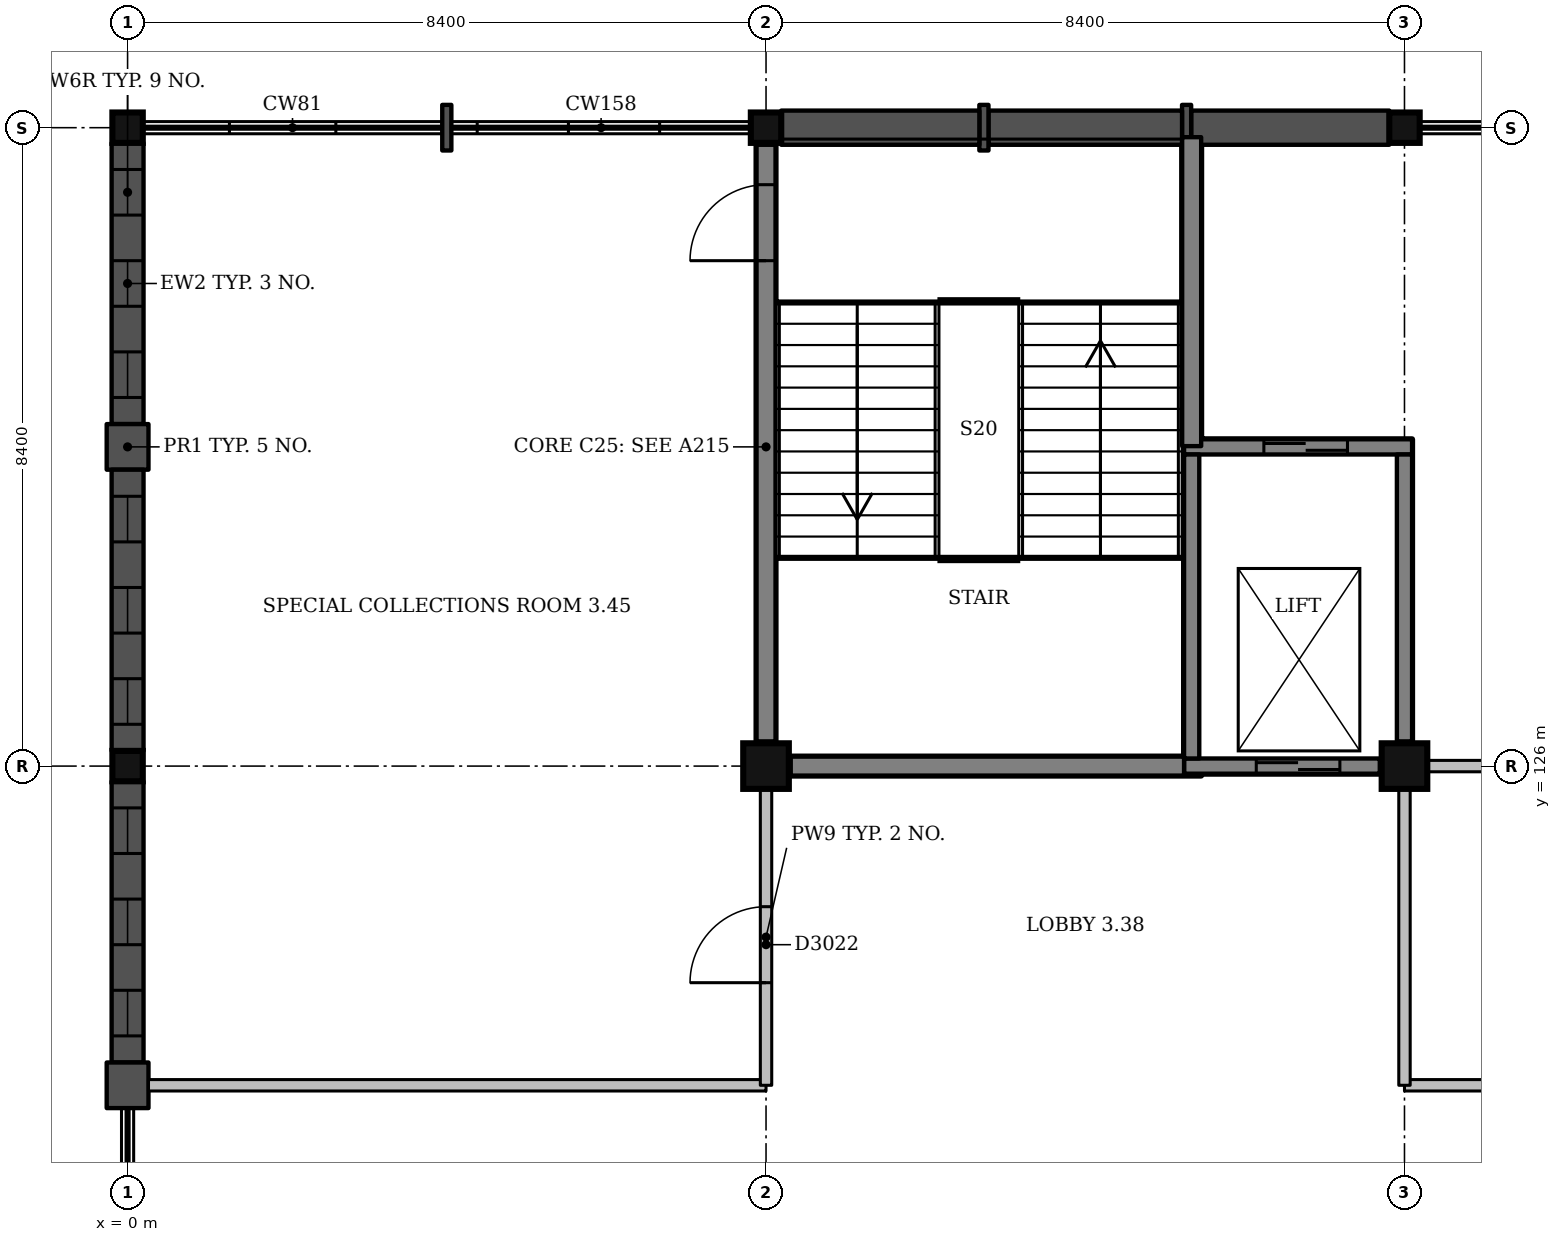
"""IFC4 building model, lengths in metres.
Left out: names, types, materials, properties, quantities, classifications, styles, units other than length and angle.
Written with IfcOpenShell. Run it as: python <this file> out.ifc"""

import sys

from ifc_helpers import new_model, si_unit, direction, frame, frame_2d, origin, origin_2d, place, context, subcontext, project, spatial, rectangle, extrude, element, fill, save


model = new_model("IFC4")
c1 = context("Model", 3, precision=1e-05, world=origin(), true_north=direction((0.0, 1.0)))
c2 = subcontext(c1, "Body", "Model", "MODEL_VIEW")
j1 = project(units=[si_unit("LENGTHUNIT", "METRE"), si_unit("PLANEANGLEUNIT", "RADIAN")], contexts=[c1])
p1 = place(None, origin())
s1 = spatial("IfcSite", under=j1, at=p1, CompositionType="ELEMENT")
p2 = place(p1, origin())
s2 = spatial("IfcBuilding", under=s1, at=p2, CompositionType="ELEMENT")
p3 = place(p2, frame((0.0, 0.0, 13.5)))
s3 = spatial("IfcBuildingStorey", under=s2, at=p3, CompositionType="ELEMENT", Elevation=13.5)
for number, where, z_axis, x_axis in (
    (1, (0.0, 126.0, 0.0), (0.0, 0.0, 1.0), (1.0, 0.0, 0.0)),
    (2, (0.0, 134.4, 0.0), (0.0, 0.0, 1.0), (1.0, 0.0, 0.0)),
):
    element("IfcColumn", number, at=place(p3, frame(where, z_axis=z_axis, x_axis=x_axis)), inside=s3, PredefinedType="COLUMN", context=c2, shape_type="SweptSolid", body=[
        extrude(rectangle(XDim=0.4, YDim=0.4, at=origin_2d()), origin(), (0.0, 0.0, 1.0), 4.5),
    ])
p4 = place(p3, frame((8.4, 126.0, 0.0), z_axis=(0.0, 0.0, 1.0), x_axis=(1.0, 0.0, 0.0)))
e3 = element("IfcColumn", 3, at=p4, inside=s3, PredefinedType="COLUMN", context=c2, shape_type="SweptSolid", body=[
    extrude(rectangle(XDim=0.6, YDim=0.6, at=origin_2d()), origin(), (0.0, 0.0, 1.0), 4.5),
])
p5 = place(p3, frame((8.4, 134.4, 0.0), z_axis=(0.0, 0.0, 1.0), x_axis=(1.0, 0.0, 0.0)))
e4 = element("IfcColumn", 4, at=p5, inside=s3, PredefinedType="COLUMN", context=c2, shape_type="SweptSolid", body=[
    extrude(rectangle(XDim=0.4, YDim=0.4, at=origin_2d()), origin(), (0.0, 0.0, 1.0), 4.5),
])
p6 = place(p3, frame((16.8, 126.0, 0.0), z_axis=(0.0, 0.0, 1.0), x_axis=(1.0, 0.0, 0.0)))
e5 = element("IfcColumn", 5, at=p6, inside=s3, PredefinedType="COLUMN", context=c2, shape_type="SweptSolid", body=[
    extrude(rectangle(XDim=0.6, YDim=0.6, at=origin_2d()), origin(), (0.0, 0.0, 1.0), 4.5),
])
p7 = place(p3, frame((16.8, 134.4, 0.0), z_axis=(0.0, 0.0, 1.0), x_axis=(1.0, 0.0, 0.0)))
e6 = element("IfcColumn", 6, at=p7, inside=s3, PredefinedType="COLUMN", context=c2, shape_type="SweptSolid", body=[
    extrude(rectangle(XDim=0.4, YDim=0.4, at=origin_2d()), origin(), (0.0, 0.0, 1.0), 4.5),
])
p8 = place(p3, frame((13.9, 126.0, 0.0), z_axis=(0.0, 0.0, 1.0), x_axis=(1.0, 0.0, 0.0)))
e7 = element("IfcWall", 7, at=p8, inside=s3, PredefinedType="SHEAR", context=c2, shape_type="SweptSolid", body=[
    extrude(rectangle(XDim=2.575, YDim=0.2, at=frame_2d((1.288, 0.0))), origin(), (0.0, 0.0, 1.0), 4.5),
])
p9 = place(p8, frame((0.95, 0.0, 0.0)))
e8 = element("IfcOpeningElement", 8, at=p9, cuts=e7, PredefinedType="OPENING", context=c2, shape_type="SweptSolid", body=[
    extrude(rectangle(XDim=1.1, YDim=2.1, at=frame_2d((0.55, 1.05))), frame((0.0, 0.11, 0.0), z_axis=(0.0, -1.0, 0.0), x_axis=(1.0, 0.0, 0.0)), (0.0, 0.0, 1.0), 0.22),
])
p10 = place(p3, frame((13.9, 130.2, 0.0), z_axis=(0.0, 0.0, 1.0), x_axis=(1.0, 0.0, 0.0)))
e9 = element("IfcWall", 9, at=p10, inside=s3, PredefinedType="SHEAR", context=c2, shape_type="SweptSolid", body=[
    extrude(rectangle(XDim=3.0, YDim=0.2, at=frame_2d((1.5, 0.0))), origin(), (0.0, 0.0, 1.0), 4.5),
])
p11 = place(p10, frame((1.05, 0.0, 0.0)))
e10 = element("IfcOpeningElement", 10, at=p11, cuts=e9, PredefinedType="OPENING", context=c2, shape_type="SweptSolid", body=[
    extrude(rectangle(XDim=1.1, YDim=2.1, at=frame_2d((0.55, 1.05))), frame((0.0, 0.11, 0.0), z_axis=(0.0, -1.0, 0.0), x_axis=(1.0, 0.0, 0.0)), (0.0, 0.0, 1.0), 0.22),
])
p12 = place(p3, frame((14.0, 126.1, 0.0), z_axis=(0.0, 0.0, 1.0), x_axis=(0.0, 1.0, 0.0)))
e11 = element("IfcWall", 11, at=p12, inside=s3, PredefinedType="SHEAR", context=c2, shape_type="SweptSolid", body=[
    extrude(rectangle(XDim=4.0, YDim=0.2, at=frame_2d((2.0, 0.0))), origin(), (0.0, 0.0, 1.0), 4.5),
])
p13 = place(p3, frame((16.8, 126.325, 0.0), z_axis=(0.0, 0.0, 1.0), x_axis=(0.0, 1.0, 0.0)))
e12 = element("IfcWall", 12, at=p13, inside=s3, PredefinedType="SHEAR", context=c2, shape_type="SweptSolid", body=[
    extrude(rectangle(XDim=3.775, YDim=0.2, at=frame_2d((1.888, 0.0))), origin(), (0.0, 0.0, 1.0), 4.5),
])
p14 = place(p3, frame((8.725, 126.0, 0.0), z_axis=(0.0, 0.0, 1.0), x_axis=(1.0, 0.0, 0.0)))
e13 = element("IfcWall", 13, at=p14, inside=s3, PredefinedType="SHEAR", context=c2, shape_type="SweptSolid", body=[
    extrude(rectangle(XDim=5.175, YDim=0.25, at=frame_2d((2.587, 0.0))), origin(), (0.0, 0.0, 1.0), 4.5),
])
p15 = place(p3, frame((8.4, 126.325, 0.0), z_axis=(0.0, 0.0, 1.0), x_axis=(0.0, 1.0, 0.0)))
e14 = element("IfcWall", 14, at=p15, inside=s3, PredefinedType="SHEAR", context=c2, shape_type="SweptSolid", body=[
    extrude(rectangle(XDim=7.85, YDim=0.25, at=frame_2d((3.925, 0.0))), origin(), (0.0, 0.0, 1.0), 4.5),
])
p16 = place(p15, frame((6.325, 0.0, 0.0)))
e15 = element("IfcOpeningElement", 15, at=p16, cuts=e14, PredefinedType="OPENING", context=c2, shape_type="SweptSolid", body=[
    extrude(rectangle(XDim=1.0, YDim=2.1, at=frame_2d((0.5, 1.05))), frame((0.0, 0.135, 0.0), z_axis=(0.0, -1.0, 0.0), x_axis=(1.0, 0.0, 0.0)), (0.0, 0.0, 1.0), 0.27),
])
p17 = place(p3, frame((14.0, 130.21, 0.0), z_axis=(0.0, 0.0, 1.0), x_axis=(0.0, 1.0, 0.0)))
e16 = element("IfcWall", 16, at=p17, inside=s3, PredefinedType="SHEAR", context=c2, shape_type="SweptSolid", body=[
    extrude(rectangle(XDim=4.065, YDim=0.25, at=frame_2d((2.032, 0.0))), origin(), (0.0, 0.0, 1.0), 4.5),
])
p18 = place(p3, frame((16.6, 134.4, 0.0), z_axis=(0.0, 0.0, 1.0), x_axis=(-1.0, 0.0, 0.0)))
e17 = element("IfcWall", 17, at=p18, inside=s3, PredefinedType="SOLIDWALL", context=c2, shape_type="SweptSolid", body=[
    extrude(rectangle(XDim=2.607, YDim=0.45, at=frame_2d((1.303, 0.0))), origin(), (0.0, 0.0, 1.0), 3.35),
])
p19 = place(p3, frame((13.993, 134.4, 0.0), z_axis=(0.0, 0.0, 1.0), x_axis=(-1.0, 0.0, 0.0)))
e18 = element("IfcWall", 18, at=p19, inside=s3, PredefinedType="SOLIDWALL", context=c2, shape_type="SweptSolid", body=[
    extrude(rectangle(XDim=0.12, YDim=0.6, at=frame_2d((0.06, 0.0))), origin(), (0.0, 0.0, 1.0), 3.35),
])
p20 = place(p3, frame((13.873, 134.4, 0.0), z_axis=(0.0, 0.0, 1.0), x_axis=(-1.0, 0.0, 0.0)))
e19 = element("IfcWall", 19, at=p20, inside=s3, PredefinedType="SOLIDWALL", context=c2, shape_type="SweptSolid", body=[
    extrude(rectangle(XDim=2.547, YDim=0.45, at=frame_2d((1.273, 0.0))), origin(), (0.0, 0.0, 1.0), 3.35),
])
p21 = place(p3, frame((11.327, 134.4, 0.0), z_axis=(0.0, 0.0, 1.0), x_axis=(-1.0, 0.0, 0.0)))
e20 = element("IfcWall", 20, at=p21, inside=s3, PredefinedType="SOLIDWALL", context=c2, shape_type="SweptSolid", body=[
    extrude(rectangle(XDim=0.12, YDim=0.6, at=frame_2d((0.06, 0.0))), origin(), (0.0, 0.0, 1.0), 3.35),
])
p22 = place(p3, frame((11.207, 134.4, 0.0), z_axis=(0.0, 0.0, 1.0), x_axis=(-1.0, 0.0, 0.0)))
e21 = element("IfcWall", 21, at=p22, inside=s3, PredefinedType="SOLIDWALL", context=c2, shape_type="SweptSolid", body=[
    extrude(rectangle(XDim=2.607, YDim=0.45, at=frame_2d((1.303, 0.0))), origin(), (0.0, 0.0, 1.0), 3.35),
])
p23 = place(p3, frame((4.26, 134.4, 0.0), z_axis=(0.0, 0.0, 1.0), x_axis=(-1.0, 0.0, 0.0)))
e22 = element("IfcWall", 22, at=p23, inside=s3, PredefinedType="SOLIDWALL", context=c2, shape_type="SweptSolid", body=[
    extrude(rectangle(XDim=0.12, YDim=0.6, at=frame_2d((0.06, 0.0))), origin(), (0.0, 0.0, 1.0), 3.35),
])
p24 = place(p3, frame((0.0, 134.2, 0.0), z_axis=(0.0, 0.0, 1.0), x_axis=(0.0, -1.0, 0.0)))
e23 = element("IfcWall", 23, at=p24, inside=s3, PredefinedType="SOLIDWALL", context=c2, shape_type="SweptSolid", body=[
    extrude(rectangle(XDim=3.7, YDim=0.42, at=frame_2d((1.85, 0.0))), origin(), (0.0, 0.0, 1.0), 3.35),
])
p25 = place(p24, frame((0.35, 0.0, 1.0)))
e24 = element("IfcOpeningElement", 24, at=p25, cuts=e23, PredefinedType="OPENING", context=c2, shape_type="SweptSolid", body=[
    extrude(rectangle(XDim=0.6, YDim=1.8, at=frame_2d((0.3, 0.9))), frame((0.0, 0.22, 0.0), z_axis=(0.0, -1.0, 0.0), x_axis=(1.0, 0.0, 0.0)), (0.0, 0.0, 1.0), 0.44),
])
p26 = place(p24, frame((1.55, 0.0, 1.0)))
e25 = element("IfcOpeningElement", 25, at=p26, cuts=e23, PredefinedType="OPENING", context=c2, shape_type="SweptSolid", body=[
    extrude(rectangle(XDim=0.6, YDim=1.8, at=frame_2d((0.3, 0.9))), frame((0.0, 0.22, 0.0), z_axis=(0.0, -1.0, 0.0), x_axis=(1.0, 0.0, 0.0)), (0.0, 0.0, 1.0), 0.44),
])
p27 = place(p24, frame((2.75, 0.0, 1.0)))
e26 = element("IfcOpeningElement", 26, at=p27, cuts=e23, PredefinedType="OPENING", context=c2, shape_type="SweptSolid", body=[
    extrude(rectangle(XDim=0.6, YDim=1.8, at=frame_2d((0.3, 0.9))), frame((0.0, 0.22, 0.0), z_axis=(0.0, -1.0, 0.0), x_axis=(1.0, 0.0, 0.0)), (0.0, 0.0, 1.0), 0.44),
])
p28 = place(p3, frame((0.0, 130.5, 0.0), z_axis=(0.0, 0.0, 1.0), x_axis=(0.0, -1.0, 0.0)))
e27 = element("IfcWall", 27, at=p28, inside=s3, PredefinedType="SOLIDWALL", context=c2, shape_type="SweptSolid", body=[
    extrude(rectangle(XDim=0.6, YDim=0.55, at=frame_2d((0.3, 0.0))), origin(), (0.0, 0.0, 1.0), 3.35),
])
p29 = place(p3, frame((0.0, 129.9, 0.0), z_axis=(0.0, 0.0, 1.0), x_axis=(0.0, -1.0, 0.0)))
e28 = element("IfcWall", 28, at=p29, inside=s3, PredefinedType="SOLIDWALL", context=c2, shape_type="SweptSolid", body=[
    extrude(rectangle(XDim=3.7, YDim=0.42, at=frame_2d((1.85, 0.0))), origin(), (0.0, 0.0, 1.0), 3.35),
])
p30 = place(p29, frame((0.35, 0.0, 1.0)))
e29 = element("IfcOpeningElement", 29, at=p30, cuts=e28, PredefinedType="OPENING", context=c2, shape_type="SweptSolid", body=[
    extrude(rectangle(XDim=0.6, YDim=1.8, at=frame_2d((0.3, 0.9))), frame((0.0, 0.22, 0.0), z_axis=(0.0, -1.0, 0.0), x_axis=(1.0, 0.0, 0.0)), (0.0, 0.0, 1.0), 0.44),
])
p31 = place(p29, frame((1.55, 0.0, 1.0)))
e30 = element("IfcOpeningElement", 30, at=p31, cuts=e28, PredefinedType="OPENING", context=c2, shape_type="SweptSolid", body=[
    extrude(rectangle(XDim=0.6, YDim=1.8, at=frame_2d((0.3, 0.9))), frame((0.0, 0.22, 0.0), z_axis=(0.0, -1.0, 0.0), x_axis=(1.0, 0.0, 0.0)), (0.0, 0.0, 1.0), 0.44),
])
p32 = place(p29, frame((2.75, 0.0, 1.0)))
e31 = element("IfcOpeningElement", 31, at=p32, cuts=e28, PredefinedType="OPENING", context=c2, shape_type="SweptSolid", body=[
    extrude(rectangle(XDim=0.6, YDim=1.8, at=frame_2d((0.3, 0.9))), frame((0.0, 0.22, 0.0), z_axis=(0.0, -1.0, 0.0), x_axis=(1.0, 0.0, 0.0)), (0.0, 0.0, 1.0), 0.44),
])
p33 = place(p3, frame((0.0, 125.8, 0.0), z_axis=(0.0, 0.0, 1.0), x_axis=(0.0, -1.0, 0.0)))
e32 = element("IfcWall", 32, at=p33, inside=s3, PredefinedType="SOLIDWALL", context=c2, shape_type="SweptSolid", body=[
    extrude(rectangle(XDim=3.7, YDim=0.42, at=frame_2d((1.85, 0.0))), origin(), (0.0, 0.0, 1.0), 3.35),
])
p34 = place(p33, frame((0.35, 0.0, 1.0)))
e33 = element("IfcOpeningElement", 33, at=p34, cuts=e32, PredefinedType="OPENING", context=c2, shape_type="SweptSolid", body=[
    extrude(rectangle(XDim=0.6, YDim=1.8, at=frame_2d((0.3, 0.9))), frame((0.0, 0.22, 0.0), z_axis=(0.0, -1.0, 0.0), x_axis=(1.0, 0.0, 0.0)), (0.0, 0.0, 1.0), 0.44),
])
p35 = place(p33, frame((1.55, 0.0, 1.0)))
e34 = element("IfcOpeningElement", 34, at=p35, cuts=e32, PredefinedType="OPENING", context=c2, shape_type="SweptSolid", body=[
    extrude(rectangle(XDim=0.6, YDim=1.8, at=frame_2d((0.3, 0.9))), frame((0.0, 0.22, 0.0), z_axis=(0.0, -1.0, 0.0), x_axis=(1.0, 0.0, 0.0)), (0.0, 0.0, 1.0), 0.44),
])
p36 = place(p33, frame((2.75, 0.0, 1.0)))
e35 = element("IfcOpeningElement", 35, at=p36, cuts=e32, PredefinedType="OPENING", context=c2, shape_type="SweptSolid", body=[
    extrude(rectangle(XDim=0.6, YDim=1.8, at=frame_2d((0.3, 0.9))), frame((0.0, 0.22, 0.0), z_axis=(0.0, -1.0, 0.0), x_axis=(1.0, 0.0, 0.0)), (0.0, 0.0, 1.0), 0.44),
])
p37 = place(p3, frame((0.0, 122.1, 0.0), z_axis=(0.0, 0.0, 1.0), x_axis=(0.0, -1.0, 0.0)))
e36 = element("IfcWall", 36, at=p37, inside=s3, PredefinedType="SOLIDWALL", context=c2, shape_type="SweptSolid", body=[
    extrude(rectangle(XDim=0.6, YDim=0.55, at=frame_2d((0.3, 0.0))), origin(), (0.0, 0.0, 1.0), 3.35),
])
p38 = place(p3, frame((0.275, 121.8, 0.0), z_axis=(0.0, 0.0, 1.0), x_axis=(1.0, 0.0, 0.0)))
e37 = element("IfcWall", 37, at=p38, inside=s3, PredefinedType="PARTITIONING", context=c2, shape_type="SweptSolid", body=[
    extrude(rectangle(XDim=8.125, YDim=0.15, at=frame_2d((4.062, 0.0))), origin(), (0.0, 0.0, 1.0), 3.4),
])
p39 = place(p3, frame((16.8, 121.8, 0.0), z_axis=(0.0, 0.0, 1.0), x_axis=(1.0, 0.0, 0.0)))
e38 = element("IfcWall", 38, at=p39, inside=s3, PredefinedType="PARTITIONING", context=c2, shape_type="SweptSolid", body=[
    extrude(rectangle(XDim=8.4, YDim=0.15, at=frame_2d((4.2, 0.0))), origin(), (0.0, 0.0, 1.0), 3.4),
])
p40 = place(p39, frame((3.8, 0.0, 0.0)))
e39 = element("IfcOpeningElement", 39, at=p40, cuts=e38, PredefinedType="OPENING", context=c2, shape_type="SweptSolid", body=[
    extrude(rectangle(XDim=0.9, YDim=2.1, at=frame_2d((0.45, 1.05))), frame((0.0, 0.085, 0.0), z_axis=(0.0, -1.0, 0.0), x_axis=(1.0, 0.0, 0.0)), (0.0, 0.0, 1.0), 0.17),
])
p41 = place(p3, frame((17.1, 126.0, 0.0), z_axis=(0.0, 0.0, 1.0), x_axis=(1.0, 0.0, 0.0)))
e40 = element("IfcWall", 40, at=p41, inside=s3, PredefinedType="PARTITIONING", context=c2, shape_type="SweptSolid", body=[
    extrude(rectangle(XDim=7.825, YDim=0.15, at=frame_2d((3.913, 0.0))), origin(), (0.0, 0.0, 1.0), 3.4),
])
p42 = place(p41, frame((3.1, 0.0, 0.0)))
e41 = element("IfcOpeningElement", 41, at=p42, cuts=e40, PredefinedType="OPENING", context=c2, shape_type="SweptSolid", body=[
    extrude(rectangle(XDim=1.8, YDim=2.1, at=frame_2d((0.9, 1.05))), frame((0.0, 0.085, 0.0), z_axis=(0.0, -1.0, 0.0), x_axis=(1.0, 0.0, 0.0)), (0.0, 0.0, 1.0), 0.17),
])
p43 = place(p3, frame((8.4, 121.8, 0.0), z_axis=(0.0, 0.0, 1.0), x_axis=(0.0, 1.0, 0.0)))
e42 = element("IfcWall", 42, at=p43, inside=s3, PredefinedType="PARTITIONING", context=c2, shape_type="SweptSolid", body=[
    extrude(rectangle(XDim=3.9, YDim=0.15, at=frame_2d((1.95, 0.0))), origin(), (0.0, 0.0, 1.0), 3.4),
])
p44 = place(p43, frame((1.35, 0.0, 0.0)))
e43 = element("IfcOpeningElement", 43, at=p44, cuts=e42, PredefinedType="OPENING", context=c2, shape_type="SweptSolid", body=[
    extrude(rectangle(XDim=1.0, YDim=2.1, at=frame_2d((0.5, 1.05))), frame((0.0, 0.085, 0.0), z_axis=(0.0, -1.0, 0.0), x_axis=(1.0, 0.0, 0.0)), (0.0, 0.0, 1.0), 0.17),
])
p45 = place(p3, frame((16.8, 121.8, 0.0), z_axis=(0.0, 0.0, 1.0), x_axis=(0.0, 1.0, 0.0)))
e44 = element("IfcWall", 44, at=p45, inside=s3, PredefinedType="PARTITIONING", context=c2, shape_type="SweptSolid", body=[
    extrude(rectangle(XDim=3.9, YDim=0.15, at=frame_2d((1.95, 0.0))), origin(), (0.0, 0.0, 1.0), 3.4),
])
p46 = place(p25, origin())
e45 = element("IfcWindow", 45, at=p46, inside=s3, PartitioningType="SINGLE_PANEL", PredefinedType="WINDOW", context=c2, shape_type="SweptSolid", body=[
    extrude(rectangle(XDim=0.6, YDim=1.8, at=frame_2d((0.3, 0.9))), frame((0.0, 0.15, 0.0), z_axis=(0.0, -1.0, 0.0), x_axis=(1.0, 0.0, 0.0)), (0.0, 0.0, 1.0), 0.06),
])
fill(e24, e45)
p47 = place(p26, origin())
e46 = element("IfcWindow", 46, at=p47, inside=s3, PartitioningType="SINGLE_PANEL", PredefinedType="WINDOW", context=c2, shape_type="SweptSolid", body=[
    extrude(rectangle(XDim=0.6, YDim=1.8, at=frame_2d((0.3, 0.9))), frame((0.0, 0.15, 0.0), z_axis=(0.0, -1.0, 0.0), x_axis=(1.0, 0.0, 0.0)), (0.0, 0.0, 1.0), 0.06),
])
fill(e25, e46)
p48 = place(p27, origin())
e47 = element("IfcWindow", 47, at=p48, inside=s3, PartitioningType="SINGLE_PANEL", PredefinedType="WINDOW", context=c2, shape_type="SweptSolid", body=[
    extrude(rectangle(XDim=0.6, YDim=1.8, at=frame_2d((0.3, 0.9))), frame((0.0, 0.15, 0.0), z_axis=(0.0, -1.0, 0.0), x_axis=(1.0, 0.0, 0.0)), (0.0, 0.0, 1.0), 0.06),
])
fill(e26, e47)
p49 = place(p30, origin())
e48 = element("IfcWindow", 48, at=p49, inside=s3, PartitioningType="SINGLE_PANEL", PredefinedType="WINDOW", context=c2, shape_type="SweptSolid", body=[
    extrude(rectangle(XDim=0.6, YDim=1.8, at=frame_2d((0.3, 0.9))), frame((0.0, 0.15, 0.0), z_axis=(0.0, -1.0, 0.0), x_axis=(1.0, 0.0, 0.0)), (0.0, 0.0, 1.0), 0.06),
])
fill(e29, e48)
p50 = place(p31, origin())
e49 = element("IfcWindow", 49, at=p50, inside=s3, PartitioningType="SINGLE_PANEL", PredefinedType="WINDOW", context=c2, shape_type="SweptSolid", body=[
    extrude(rectangle(XDim=0.6, YDim=1.8, at=frame_2d((0.3, 0.9))), frame((0.0, 0.15, 0.0), z_axis=(0.0, -1.0, 0.0), x_axis=(1.0, 0.0, 0.0)), (0.0, 0.0, 1.0), 0.06),
])
fill(e30, e49)
p51 = place(p32, origin())
e50 = element("IfcWindow", 50, at=p51, inside=s3, PartitioningType="SINGLE_PANEL", PredefinedType="WINDOW", context=c2, shape_type="SweptSolid", body=[
    extrude(rectangle(XDim=0.6, YDim=1.8, at=frame_2d((0.3, 0.9))), frame((0.0, 0.15, 0.0), z_axis=(0.0, -1.0, 0.0), x_axis=(1.0, 0.0, 0.0)), (0.0, 0.0, 1.0), 0.06),
])
fill(e31, e50)
p52 = place(p34, origin())
e51 = element("IfcWindow", 51, at=p52, inside=s3, PartitioningType="SINGLE_PANEL", PredefinedType="WINDOW", context=c2, shape_type="SweptSolid", body=[
    extrude(rectangle(XDim=0.6, YDim=1.8, at=frame_2d((0.3, 0.9))), frame((0.0, 0.15, 0.0), z_axis=(0.0, -1.0, 0.0), x_axis=(1.0, 0.0, 0.0)), (0.0, 0.0, 1.0), 0.06),
])
fill(e33, e51)
p53 = place(p35, origin())
e52 = element("IfcWindow", 52, at=p53, inside=s3, PartitioningType="SINGLE_PANEL", PredefinedType="WINDOW", context=c2, shape_type="SweptSolid", body=[
    extrude(rectangle(XDim=0.6, YDim=1.8, at=frame_2d((0.3, 0.9))), frame((0.0, 0.15, 0.0), z_axis=(0.0, -1.0, 0.0), x_axis=(1.0, 0.0, 0.0)), (0.0, 0.0, 1.0), 0.06),
])
fill(e34, e52)
p54 = place(p36, origin())
e53 = element("IfcWindow", 53, at=p54, inside=s3, PartitioningType="SINGLE_PANEL", PredefinedType="WINDOW", context=c2, shape_type="SweptSolid", body=[
    extrude(rectangle(XDim=0.6, YDim=1.8, at=frame_2d((0.3, 0.9))), frame((0.0, 0.15, 0.0), z_axis=(0.0, -1.0, 0.0), x_axis=(1.0, 0.0, 0.0)), (0.0, 0.0, 1.0), 0.06),
])
fill(e35, e53)
p55 = place(p44, origin())
e54 = element("IfcDoor", 54, at=p55, inside=s3, OperationType="SINGLE_SWING_LEFT", PredefinedType="DOOR", context=c2, shape_type="SweptSolid", body=[
    extrude(rectangle(XDim=1.0, YDim=2.1, at=frame_2d((0.5, 1.05))), frame((0.0, 0.025, 0.0), z_axis=(0.0, -1.0, 0.0), x_axis=(1.0, 0.0, 0.0)), (0.0, 0.0, 1.0), 0.05),
])
fill(e43, e54)
p56 = place(p16, origin())
e55 = element("IfcDoor", 55, at=p56, inside=s3, OperationType="SINGLE_SWING_LEFT", PredefinedType="DOOR", context=c2, shape_type="SweptSolid", body=[
    extrude(rectangle(XDim=1.0, YDim=2.1, at=frame_2d((0.5, 1.05))), frame((0.0, 0.025, 0.0), z_axis=(0.0, -1.0, 0.0), x_axis=(1.0, 0.0, 0.0)), (0.0, 0.0, 1.0), 0.05),
])
fill(e15, e55)
p57 = place(p9, origin())
e56 = element("IfcDoor", 56, at=p57, inside=s3, OperationType="SLIDING_TO_RIGHT", PredefinedType="DOOR", context=c2, shape_type="SweptSolid", body=[
    extrude(rectangle(XDim=1.1, YDim=2.1, at=frame_2d((0.55, 1.05))), frame((0.0, 0.025, 0.0), z_axis=(0.0, -1.0, 0.0), x_axis=(1.0, 0.0, 0.0)), (0.0, 0.0, 1.0), 0.05),
])
fill(e8, e56)
p58 = place(p11, origin())
e57 = element("IfcDoor", 57, at=p58, inside=s3, OperationType="SLIDING_TO_LEFT", PredefinedType="DOOR", context=c2, shape_type="SweptSolid", body=[
    extrude(rectangle(XDim=1.1, YDim=2.1, at=frame_2d((0.55, 1.05))), frame((0.0, 0.025, 0.0), z_axis=(0.0, -1.0, 0.0), x_axis=(1.0, 0.0, 0.0)), (0.0, 0.0, 1.0), 0.05),
])
fill(e10, e57)
save(model, sys.argv[1])
